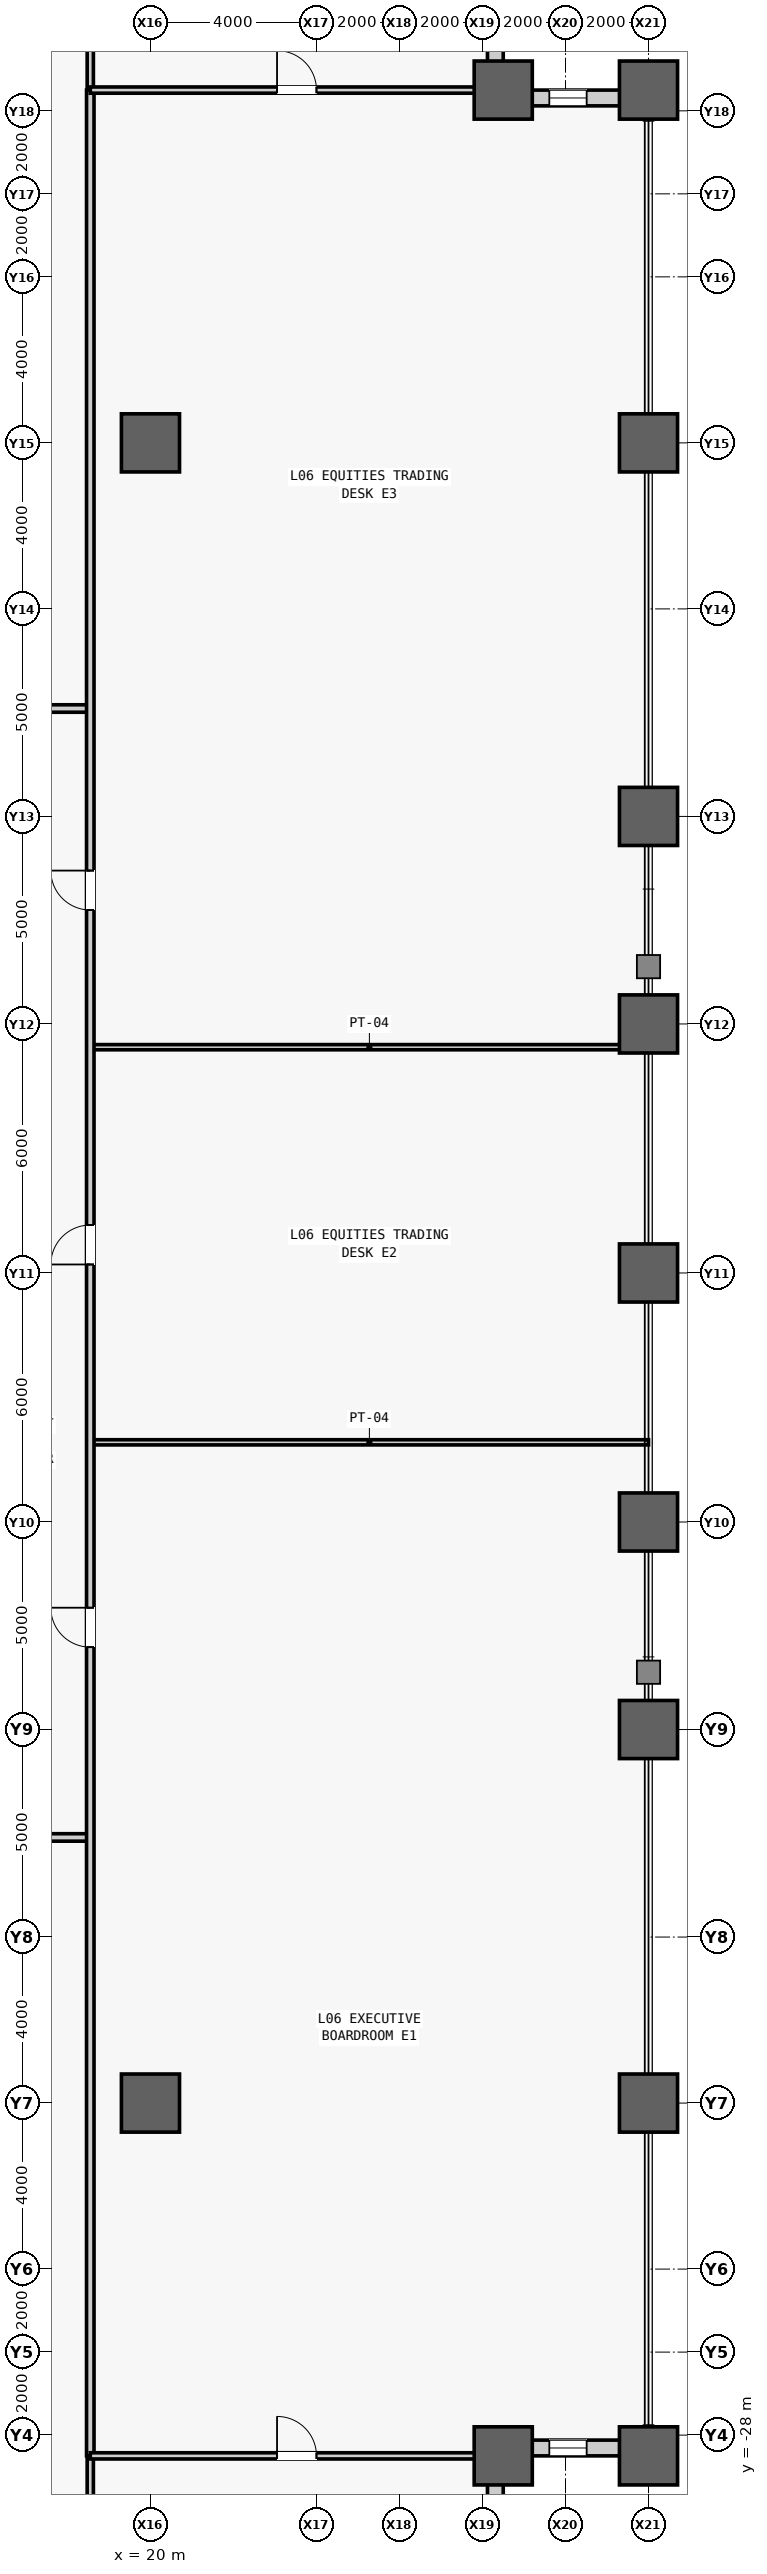
"""IFC4 building model, lengths in metres.
Left out: names, types, materials, properties, quantities, classifications, styles, units other than length and angle.
Written with IfcOpenShell. Run it as: python <this file> out.ifc"""

import sys

from ifc_helpers import new_model, si_unit, direction, frame, frame_2d, origin, origin_2d, place, context, subcontext, project, spatial, rectangle, hollow_rectangle, extrude, source, transform, mapped, element, fill, save


model = new_model("IFC4")
c1 = context("Model", 3, precision=1e-05, world=origin(), true_north=direction((0.0, 1.0)))
c2 = subcontext(c1, "Body", "Model", "MODEL_VIEW")
j1 = project(units=[si_unit("LENGTHUNIT", "METRE"), si_unit("PLANEANGLEUNIT", "RADIAN")], contexts=[c1])
p1 = place(None, origin())
s1 = spatial("IfcSite", under=j1, at=p1, CompositionType="ELEMENT")
p2 = place(p1, origin())
s2 = spatial("IfcBuilding", under=s1, at=p2, CompositionType="ELEMENT")
p3 = place(p2, frame((0.0, 0.0, 32.6)))
s3 = spatial("IfcBuildingStorey", under=s2, at=p3, CompositionType="ELEMENT", Elevation=32.6)
m1 = source(origin(), c2, "Body", "SweptSolid", [
    extrude(hollow_rectangle(XDim=1.4, YDim=1.4, WallThickness=0.075, at=origin_2d()), origin(), (0.0, 0.0, 1.0), 4.2),
])
for number, where, z_axis, x_axis in (
    (1, (20.0, -20.0, 0.0), (0.0, 0.0, 1.0), (1.0, 0.0, 0.0)),
    (2, (20.0, 20.0, 0.0), (0.0, 0.0, 1.0), (1.0, 0.0, 0.0)),
    (3, (28.5, -28.5, 0.0), (0.0, 0.0, 1.0), (1.0, 0.0, 0.0)),
    (4, (28.5, 28.5, 0.0), (0.0, 0.0, 1.0), (1.0, 0.0, 0.0)),
    (5, (32.0, -28.5, 0.0), (0.0, 0.0, 1.0), (1.0, 0.0, 0.0)),
    (6, (32.0, -20.0, 0.0), (0.0, 0.0, 1.0), (1.0, 0.0, 0.0)),
    (7, (32.0, -11.0, 0.0), (0.0, 0.0, 1.0), (1.0, 0.0, 0.0)),
    (8, (32.0, -6.0, 0.0), (0.0, 0.0, 1.0), (1.0, 0.0, 0.0)),
    (9, (32.0, 0.0, 0.0), (0.0, 0.0, 1.0), (1.0, 0.0, 0.0)),
    (10, (32.0, 6.0, 0.0), (0.0, 0.0, 1.0), (1.0, 0.0, 0.0)),
    (11, (32.0, 11.0, 0.0), (0.0, 0.0, 1.0), (1.0, 0.0, 0.0)),
    (12, (32.0, 20.0, 0.0), (0.0, 0.0, 1.0), (1.0, 0.0, 0.0)),
    (13, (32.0, 28.5, 0.0), (0.0, 0.0, 1.0), (1.0, 0.0, 0.0)),
):
    element("IfcColumn", number, at=place(p3, frame(where, z_axis=z_axis, x_axis=x_axis)), inside=s3, PredefinedType="COLUMN", context=c2, shape_type="MappedRepresentation", body=[
        mapped(m1, transform((0.0, 0.0, 0.0), scale=1.0)),
    ])
m2 = source(origin(), c2, "Body", "SweptSolid", [
    extrude(rectangle(XDim=3.12, YDim=0.38, at=frame_2d((1.56, 0.0))), origin(), (0.0, 0.0, 1.0), 3.245),
])
p4 = place(p3, frame((28.31, -31.62, 0.0), z_axis=(0.0, 0.0, 1.0), x_axis=(0.0, 1.0, 0.0)))
e14 = element("IfcWall", 14, at=p4, inside=s3, PredefinedType="STANDARD", context=c2, shape_type="MappedRepresentation", body=[
    mapped(m2, transform((0.0, 0.0, 0.0), scale=1.0)),
])
m3 = source(origin(), c2, "Body", "SweptSolid", [
    extrude(rectangle(XDim=0.9, YDim=2.4, at=frame_2d((0.45, 1.2))), frame((0.0, 0.2, 0.0), z_axis=(0.0, -1.0, 0.0), x_axis=(1.0, 0.0, 0.0)), (0.0, 0.0, 1.0), 0.4),
])
p5 = place(p4, frame((1.11, 0.0, 0.5)))
e15 = element("IfcOpeningElement", 15, at=p5, cuts=e14, PredefinedType="OPENING", context=c2, shape_type="MappedRepresentation", body=[
    mapped(m3, transform((0.0, 0.0, 0.0), scale=1.0)),
])
p6 = place(p3, frame((28.5, -28.31, 0.0), z_axis=(0.0, 0.0, 1.0), x_axis=(1.0, 0.0, 0.0)))
e16 = element("IfcWall", 16, at=p6, inside=s3, PredefinedType="STANDARD", context=c2, shape_type="MappedRepresentation", body=[
    mapped(m2, transform((0.0, 0.0, 0.0), scale=1.0)),
])
p7 = place(p6, frame((1.11, 0.0, 0.5)))
e17 = element("IfcOpeningElement", 17, at=p7, cuts=e16, PredefinedType="OPENING", context=c2, shape_type="MappedRepresentation", body=[
    mapped(m3, transform((0.0, 0.0, 0.0), scale=1.0)),
])
p8 = place(p3, frame((28.5, 28.31, 0.0), z_axis=(0.0, 0.0, 1.0), x_axis=(1.0, 0.0, 0.0)))
e18 = element("IfcWall", 18, at=p8, inside=s3, PredefinedType="STANDARD", context=c2, shape_type="MappedRepresentation", body=[
    mapped(m2, transform((0.0, 0.0, 0.0), scale=1.0)),
])
p9 = place(p8, frame((1.11, 0.0, 0.5)))
e19 = element("IfcOpeningElement", 19, at=p9, cuts=e18, PredefinedType="OPENING", context=c2, shape_type="MappedRepresentation", body=[
    mapped(m3, transform((0.0, 0.0, 0.0), scale=1.0)),
])
p10 = place(p3, frame((28.31, 28.5, 0.0), z_axis=(0.0, 0.0, 1.0), x_axis=(0.0, 1.0, 0.0)))
e20 = element("IfcWall", 20, at=p10, inside=s3, PredefinedType="STANDARD", context=c2, shape_type="MappedRepresentation", body=[
    mapped(m2, transform((0.0, 0.0, 0.0), scale=1.0)),
])
p11 = place(p10, frame((1.11, 0.0, 0.5)))
e21 = element("IfcOpeningElement", 21, at=p11, cuts=e20, PredefinedType="OPENING", context=c2, shape_type="MappedRepresentation", body=[
    mapped(m3, transform((0.0, 0.0, 0.0), scale=1.0)),
])
m4 = source(origin(), c2, "Body", "SweptSolid", [
    extrude(rectangle(XDim=36.25, YDim=0.18, at=frame_2d((18.125, 0.0))), origin(), (0.0, 0.0, 1.0), 3.94),
])
p12 = place(p3, frame((-17.7, -13.6, 0.0), z_axis=(0.0, 0.0, 1.0), x_axis=(1.0, 0.0, 0.0)))
e22 = element("IfcWall", 22, at=p12, inside=s3, PredefinedType="PARTITIONING", context=c2, shape_type="MappedRepresentation", body=[
    mapped(m4, transform((0.0, 0.0, 0.0), scale=1.0)),
])
m5 = source(origin(), c2, "Body", "SweptSolid", [
    extrude(rectangle(XDim=1.05, YDim=2.2, at=frame_2d((0.525, 1.1))), frame((0.0, 0.1, 0.0), z_axis=(0.0, -1.0, 0.0), x_axis=(1.0, 0.0, 0.0)), (0.0, 0.0, 1.0), 0.2),
])
p13 = place(p12, frame((17.175, 0.0, 0.0)))
e23 = element("IfcOpeningElement", 23, at=p13, cuts=e22, PredefinedType="OPENING", context=c2, shape_type="MappedRepresentation", body=[
    mapped(m5, transform((0.0, 0.0, 0.0), scale=1.0)),
])
p14 = place(p3, frame((-17.7, 13.6, 0.0), z_axis=(0.0, 0.0, 1.0), x_axis=(1.0, 0.0, 0.0)))
e24 = element("IfcWall", 24, at=p14, inside=s3, PredefinedType="PARTITIONING", context=c2, shape_type="MappedRepresentation", body=[
    mapped(m4, transform((0.0, 0.0, 0.0), scale=1.0)),
])
p15 = place(p14, frame((5.113, 0.0, 0.0)))
e25 = element("IfcOpeningElement", 25, at=p15, cuts=e24, PredefinedType="OPENING", context=c2, shape_type="MappedRepresentation", body=[
    mapped(m5, transform((0.0, 0.0, 0.0), scale=1.0)),
])
p16 = place(p14, frame((12.525, 0.0, 0.0)))
e26 = element("IfcOpeningElement", 26, at=p16, cuts=e24, PredefinedType="OPENING", context=c2, shape_type="MappedRepresentation", body=[
    mapped(m5, transform((0.0, 0.0, 0.0), scale=1.0)),
])
p17 = place(p14, frame((22.675, 0.0, 0.0)))
e27 = element("IfcOpeningElement", 27, at=p17, cuts=e24, PredefinedType="OPENING", context=c2, shape_type="MappedRepresentation", body=[
    mapped(m5, transform((0.0, 0.0, 0.0), scale=1.0)),
])
p18 = place(p14, frame((29.663, 0.0, 0.0)))
e28 = element("IfcOpeningElement", 28, at=p18, cuts=e24, PredefinedType="OPENING", context=c2, shape_type="MappedRepresentation", body=[
    mapped(m5, transform((0.0, 0.0, 0.0), scale=1.0)),
])
m6 = source(origin(), c2, "Body", "SweptSolid", [
    extrude(rectangle(XDim=3.5, YDim=0.15, at=frame_2d((1.75, 0.0))), origin(), (0.0, 0.0, 1.0), 3.94),
])
for number, where, z_axis, x_axis in (
    (29, (18.55, -32.0, 0.0), (0.0, 0.0, 1.0), (0.0, 1.0, 0.0)),
    (30, (18.55, 28.5, 0.0), (0.0, 0.0, 1.0), (0.0, 1.0, 0.0)),
):
    element("IfcWall", number, at=place(p3, frame(where, z_axis=z_axis, x_axis=x_axis)), inside=s3, PredefinedType="PARTITIONING", context=c2, shape_type="MappedRepresentation", body=[
        mapped(m6, transform((0.0, 0.0, 0.0), scale=1.0)),
    ])
m7 = source(origin(), c2, "Body", "SweptSolid", [
    extrude(rectangle(XDim=13.45, YDim=0.125, at=frame_2d((6.725, 0.0))), origin(), (0.0, 0.0, 1.0), 3.94),
])
for number, where, z_axis, x_axis in (
    (31, (18.55, -4.08, 0.0), (0.0, 0.0, 1.0), (1.0, 0.0, 0.0)),
    (32, (18.55, 5.44, 0.0), (0.0, 0.0, 1.0), (1.0, 0.0, 0.0)),
):
    element("IfcWall", number, at=place(p3, frame(where, z_axis=z_axis, x_axis=x_axis)), inside=s3, PredefinedType="PARTITIONING", context=c2, shape_type="MappedRepresentation", body=[
        mapped(m7, transform((0.0, 0.0, 0.0), scale=1.0)),
    ])
m8 = source(origin(), c2, "Body", "SweptSolid", [
    extrude(rectangle(XDim=57.0, YDim=0.18, at=frame_2d((28.5, 0.0))), origin(), (0.0, 0.0, 1.0), 3.94),
])
p19 = place(p3, frame((18.55, -28.5, 0.0), z_axis=(0.0, 0.0, 1.0), x_axis=(0.0, 1.0, 0.0)))
e33 = element("IfcWall", 33, at=p19, inside=s3, PredefinedType="PARTITIONING", context=c2, shape_type="MappedRepresentation", body=[
    mapped(m8, transform((0.0, 0.0, 0.0), scale=1.0)),
])
m9 = source(origin(), c2, "Body", "SweptSolid", [
    extrude(rectangle(XDim=0.95, YDim=2.15, at=frame_2d((0.475, 1.075))), frame((0.0, 0.1, 0.0), z_axis=(0.0, -1.0, 0.0), x_axis=(1.0, 0.0, 0.0)), (0.0, 0.0, 1.0), 0.2),
])
p20 = place(p19, frame((19.485, 0.0, 0.0)))
e34 = element("IfcOpeningElement", 34, at=p20, cuts=e33, PredefinedType="OPENING", context=c2, shape_type="MappedRepresentation", body=[
    mapped(m9, transform((0.0, 0.0, 0.0), scale=1.0)),
])
p21 = place(p19, frame((28.705, 0.0, 0.0)))
e35 = element("IfcOpeningElement", 35, at=p21, cuts=e33, PredefinedType="OPENING", context=c2, shape_type="MappedRepresentation", body=[
    mapped(m9, transform((0.0, 0.0, 0.0), scale=1.0)),
])
p22 = place(p19, frame((37.245, 0.0, 0.0)))
e36 = element("IfcOpeningElement", 36, at=p22, cuts=e33, PredefinedType="OPENING", context=c2, shape_type="MappedRepresentation", body=[
    mapped(m9, transform((0.0, 0.0, 0.0), scale=1.0)),
])
m10 = source(origin(), c2, "Body", "SweptSolid", [
    extrude(rectangle(XDim=9.95, YDim=0.15, at=frame_2d((4.975, 0.0))), origin(), (0.0, 0.0, 1.0), 3.94),
])
p23 = place(p3, frame((18.55, -28.5, 0.0), z_axis=(0.0, 0.0, 1.0), x_axis=(1.0, 0.0, 0.0)))
e37 = element("IfcWall", 37, at=p23, inside=s3, PredefinedType="PARTITIONING", context=c2, shape_type="MappedRepresentation", body=[
    mapped(m10, transform((0.0, 0.0, 0.0), scale=1.0)),
])
m11 = source(origin(), c2, "Body", "SweptSolid", [
    extrude(rectangle(XDim=0.95, YDim=2.15, at=frame_2d((0.475, 1.075))), frame((0.0, 0.085, 0.0), z_axis=(0.0, -1.0, 0.0), x_axis=(1.0, 0.0, 0.0)), (0.0, 0.0, 1.0), 0.17),
])
p24 = place(p23, frame((4.5, 0.0, 0.0)))
e38 = element("IfcOpeningElement", 38, at=p24, cuts=e37, PredefinedType="OPENING", context=c2, shape_type="MappedRepresentation", body=[
    mapped(m11, transform((0.0, 0.0, 0.0), scale=1.0)),
])
p25 = place(p3, frame((18.55, 28.5, 0.0), z_axis=(0.0, 0.0, 1.0), x_axis=(1.0, 0.0, 0.0)))
e39 = element("IfcWall", 39, at=p25, inside=s3, PredefinedType="PARTITIONING", context=c2, shape_type="MappedRepresentation", body=[
    mapped(m10, transform((0.0, 0.0, 0.0), scale=1.0)),
])
p26 = place(p25, frame((4.5, 0.0, 0.0)))
e40 = element("IfcOpeningElement", 40, at=p26, cuts=e39, PredefinedType="OPENING", context=c2, shape_type="MappedRepresentation", body=[
    mapped(m11, transform((0.0, 0.0, 0.0), scale=1.0)),
])
m12 = source(origin(), c2, "Body", "SweptSolid", [
    extrude(rectangle(XDim=0.9, YDim=2.4, at=frame_2d((0.45, 1.2))), frame((0.0, 0.03, 0.0), z_axis=(0.0, -1.0, 0.0), x_axis=(1.0, 0.0, 0.0)), (0.0, 0.0, 1.0), 0.06),
])
p27 = place(p7, origin())
e41 = element("IfcWindow", 41, at=p27, inside=s3, PartitioningType="SINGLE_PANEL", PredefinedType="WINDOW", context=c2, shape_type="MappedRepresentation", body=[
    mapped(m12, transform((0.0, 0.0, 0.0), scale=1.0)),
])
fill(e17, e41)
p28 = place(p9, origin())
e42 = element("IfcWindow", 42, at=p28, inside=s3, PartitioningType="SINGLE_PANEL", PredefinedType="WINDOW", context=c2, shape_type="MappedRepresentation", body=[
    mapped(m12, transform((0.0, 0.0, 0.0), scale=1.0)),
])
fill(e19, e42)
m13 = source(origin(), c2, "Body", "SweptSolid", [
    extrude(rectangle(XDim=0.95, YDim=2.15, at=frame_2d((0.475, 1.075))), frame((0.0, 0.025, 0.0), z_axis=(0.0, -1.0, 0.0), x_axis=(1.0, 0.0, 0.0)), (0.0, 0.0, 1.0), 0.05),
])
p29 = place(p20, origin())
e43 = element("IfcDoor", 43, at=p29, inside=s3, OperationType="SINGLE_SWING_RIGHT", PredefinedType="DOOR", context=c2, shape_type="MappedRepresentation", body=[
    mapped(m13, transform((0.0, 0.0, 0.0), scale=1.0)),
])
fill(e34, e43)
p30 = place(p21, origin())
e44 = element("IfcDoor", 44, at=p30, inside=s3, OperationType="SINGLE_SWING_LEFT", PredefinedType="DOOR", context=c2, shape_type="MappedRepresentation", body=[
    mapped(m13, transform((0.0, 0.0, 0.0), scale=1.0)),
])
fill(e35, e44)
p31 = place(p22, origin())
e45 = element("IfcDoor", 45, at=p31, inside=s3, OperationType="SINGLE_SWING_RIGHT", PredefinedType="DOOR", context=c2, shape_type="MappedRepresentation", body=[
    mapped(m13, transform((0.0, 0.0, 0.0), scale=1.0)),
])
fill(e36, e45)
p32 = place(p24, origin())
e46 = element("IfcDoor", 46, at=p32, inside=s3, OperationType="SINGLE_SWING_LEFT", PredefinedType="DOOR", context=c2, shape_type="MappedRepresentation", body=[
    mapped(m13, transform((0.0, 0.0, 0.0), scale=1.0)),
])
fill(e38, e46)
p33 = place(p26, origin())
e47 = element("IfcDoor", 47, at=p33, inside=s3, OperationType="SINGLE_SWING_LEFT", PredefinedType="DOOR", context=c2, shape_type="MappedRepresentation", body=[
    mapped(m13, transform((0.0, 0.0, 0.0), scale=1.0)),
])
fill(e40, e47)
save(model, sys.argv[1])
